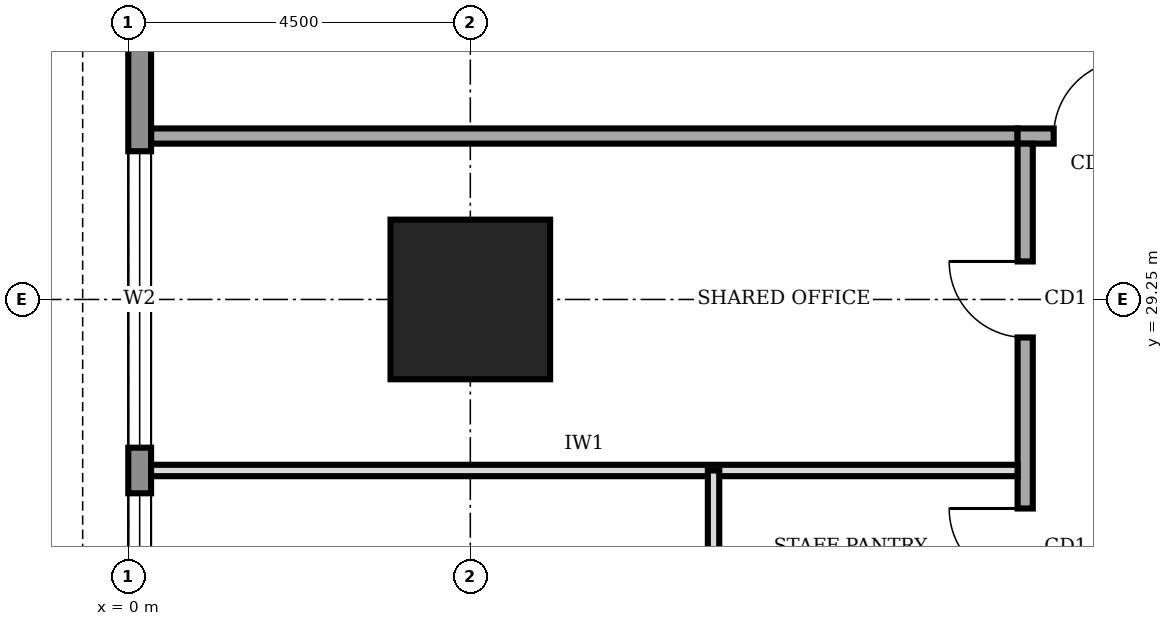
"""IFC4 building model, lengths in metres.
Left out: names, types, materials, properties, quantities, classifications, styles, units other than length and angle.
Written with IfcOpenShell. Run it as: python <this file> out.ifc"""

import sys

from ifc_helpers import new_model, si_unit, direction, frame, frame_2d, origin, origin_2d, place, context, subcontext, project, spatial, rectangle, extrude, element, fill, save


model = new_model("IFC4")
c1 = context("Model", 3, precision=1e-05, world=origin(), true_north=direction((0.0, 1.0)))
c2 = subcontext(c1, "Body", "Model", "MODEL_VIEW")
j1 = project(units=[si_unit("LENGTHUNIT", "METRE"), si_unit("PLANEANGLEUNIT", "RADIAN")], contexts=[c1])
p1 = place(None, origin())
s1 = spatial("IfcSite", under=j1, at=p1, CompositionType="ELEMENT")
p2 = place(p1, origin())
s2 = spatial("IfcBuilding", under=s1, at=p2, CompositionType="ELEMENT")
p3 = place(p2, frame((0.0, 0.0, 137.0)))
s3 = spatial("IfcBuildingStorey", under=s2, at=p3, CompositionType="ELEMENT", Elevation=137.0)
p4 = place(p3, frame((4.5, 29.25, 0.0), z_axis=(0.0, 0.0, 1.0), x_axis=(1.0, 0.0, 0.0)))
e1 = element("IfcColumn", 1, at=p4, inside=s3, PredefinedType="COLUMN", context=c2, shape_type="SweptSolid", body=[
    extrude(rectangle(XDim=2.1, YDim=2.1, at=origin_2d()), origin(), (0.0, 0.0, 1.0), 4.0),
])
p5 = place(p3, frame((0.15, 35.98, 0.0), z_axis=(0.0, 0.0, 1.0), x_axis=(0.0, -1.0, 0.0)))
e2 = element("IfcWall", 2, at=p5, inside=s3, PredefinedType="STANDARD", context=c2, shape_type="SweptSolid", body=[
    extrude(rectangle(XDim=31.46, YDim=0.3, at=frame_2d((15.73, 0.0))), origin(), (0.0, 0.0, 1.0), 3.75),
])
p6 = place(p5, frame((27.28, 0.0, 0.6)))
e3 = element("IfcOpeningElement", 3, at=p6, cuts=e2, PredefinedType="OPENING", context=c2, shape_type="SweptSolid", body=[
    extrude(rectangle(XDim=3.9, YDim=2.6, at=frame_2d((1.95, 1.3))), frame((0.0, 0.16, 0.0), z_axis=(0.0, -1.0, 0.0), x_axis=(1.0, 0.0, 0.0)), (0.0, 0.0, 1.0), 0.32),
])
p7 = place(p5, frame((22.78, 0.0, 0.6)))
e4 = element("IfcOpeningElement", 4, at=p7, cuts=e2, PredefinedType="OPENING", context=c2, shape_type="SweptSolid", body=[
    extrude(rectangle(XDim=3.9, YDim=2.6, at=frame_2d((1.95, 1.3))), frame((0.0, 0.16, 0.0), z_axis=(0.0, -1.0, 0.0), x_axis=(1.0, 0.0, 0.0)), (0.0, 0.0, 1.0), 0.32),
])
p8 = place(p5, frame((18.28, 0.0, 0.6)))
e5 = element("IfcOpeningElement", 5, at=p8, cuts=e2, PredefinedType="OPENING", context=c2, shape_type="SweptSolid", body=[
    extrude(rectangle(XDim=3.9, YDim=2.6, at=frame_2d((1.95, 1.3))), frame((0.0, 0.16, 0.0), z_axis=(0.0, -1.0, 0.0), x_axis=(1.0, 0.0, 0.0)), (0.0, 0.0, 1.0), 0.32),
])
p9 = place(p5, frame((13.78, 0.0, 0.6)))
e6 = element("IfcOpeningElement", 6, at=p9, cuts=e2, PredefinedType="OPENING", context=c2, shape_type="SweptSolid", body=[
    extrude(rectangle(XDim=3.9, YDim=2.6, at=frame_2d((1.95, 1.3))), frame((0.0, 0.16, 0.0), z_axis=(0.0, -1.0, 0.0), x_axis=(1.0, 0.0, 0.0)), (0.0, 0.0, 1.0), 0.32),
])
p10 = place(p5, frame((9.28, 0.0, 0.6)))
e7 = element("IfcOpeningElement", 7, at=p10, cuts=e2, PredefinedType="OPENING", context=c2, shape_type="SweptSolid", body=[
    extrude(rectangle(XDim=3.9, YDim=2.6, at=frame_2d((1.95, 1.3))), frame((0.0, 0.16, 0.0), z_axis=(0.0, -1.0, 0.0), x_axis=(1.0, 0.0, 0.0)), (0.0, 0.0, 1.0), 0.32),
])
p11 = place(p5, frame((4.78, 0.0, 0.6)))
e8 = element("IfcOpeningElement", 8, at=p11, cuts=e2, PredefinedType="OPENING", context=c2, shape_type="SweptSolid", body=[
    extrude(rectangle(XDim=3.9, YDim=2.6, at=frame_2d((1.95, 1.3))), frame((0.0, 0.16, 0.0), z_axis=(0.0, -1.0, 0.0), x_axis=(1.0, 0.0, 0.0)), (0.0, 0.0, 1.0), 0.32),
])
p12 = place(p3, frame((28.6, 31.4, 0.0), z_axis=(0.0, 0.0, 1.0), x_axis=(-1.0, 0.0, 0.0)))
e9 = element("IfcWall", 9, at=p12, inside=s3, PredefinedType="SOLIDWALL", context=c2, shape_type="SweptSolid", body=[
    extrude(rectangle(XDim=16.9, YDim=0.2, at=frame_2d((8.45, 0.0))), origin(), (0.0, 0.0, 1.0), 3.75),
])
p13 = place(p12, frame((15.425, 0.0, 0.0)))
e10 = element("IfcOpeningElement", 10, at=p13, cuts=e9, PredefinedType="OPENING", context=c2, shape_type="SweptSolid", body=[
    extrude(rectangle(XDim=1.0, YDim=2.1, at=frame_2d((0.5, 1.05))), frame((0.0, 0.11, 0.0), z_axis=(0.0, -1.0, 0.0), x_axis=(1.0, 0.0, 0.0)), (0.0, 0.0, 1.0), 0.22),
])
p14 = place(p12, frame((12.35, 0.0, 0.0)))
e11 = element("IfcOpeningElement", 11, at=p14, cuts=e9, PredefinedType="OPENING", context=c2, shape_type="SweptSolid", body=[
    extrude(rectangle(XDim=1.0, YDim=2.1, at=frame_2d((0.5, 1.05))), frame((0.0, 0.11, 0.0), z_axis=(0.0, -1.0, 0.0), x_axis=(1.0, 0.0, 0.0)), (0.0, 0.0, 1.0), 0.22),
])
p15 = place(p12, frame((5.6, 0.0, 0.0)))
e12 = element("IfcOpeningElement", 12, at=p15, cuts=e9, PredefinedType="OPENING", context=c2, shape_type="SweptSolid", body=[
    extrude(rectangle(XDim=1.0, YDim=2.1, at=frame_2d((0.5, 1.05))), frame((0.0, 0.11, 0.0), z_axis=(0.0, -1.0, 0.0), x_axis=(1.0, 0.0, 0.0)), (0.0, 0.0, 1.0), 0.22),
])
p16 = place(p12, frame((0.275, 0.0, 0.0)))
e13 = element("IfcOpeningElement", 13, at=p16, cuts=e9, PredefinedType="OPENING", context=c2, shape_type="SweptSolid", body=[
    extrude(rectangle(XDim=1.0, YDim=2.1, at=frame_2d((0.5, 1.05))), frame((0.0, 0.11, 0.0), z_axis=(0.0, -1.0, 0.0), x_axis=(1.0, 0.0, 0.0)), (0.0, 0.0, 1.0), 0.22),
])
p17 = place(p3, frame((11.8, 31.3, 0.0), z_axis=(0.0, 0.0, 1.0), x_axis=(0.0, -1.0, 0.0)))
e14 = element("IfcWall", 14, at=p17, inside=s3, PredefinedType="SOLIDWALL", context=c2, shape_type="SweptSolid", body=[
    extrude(rectangle(XDim=22.3, YDim=0.2, at=frame_2d((11.15, 0.0))), origin(), (0.0, 0.0, 1.0), 3.75),
])
p18 = place(p17, frame((19.55, 0.0, 0.0)))
e15 = element("IfcOpeningElement", 15, at=p18, cuts=e14, PredefinedType="OPENING", context=c2, shape_type="SweptSolid", body=[
    extrude(rectangle(XDim=1.0, YDim=2.1, at=frame_2d((0.5, 1.05))), frame((0.0, 0.11, 0.0), z_axis=(0.0, -1.0, 0.0), x_axis=(1.0, 0.0, 0.0)), (0.0, 0.0, 1.0), 0.22),
])
p19 = place(p17, frame((15.45, 0.0, 0.0)))
e16 = element("IfcOpeningElement", 16, at=p19, cuts=e14, PredefinedType="OPENING", context=c2, shape_type="SweptSolid", body=[
    extrude(rectangle(XDim=0.9, YDim=2.1, at=frame_2d((0.45, 1.05))), frame((0.0, 0.11, 0.0), z_axis=(0.0, -1.0, 0.0), x_axis=(1.0, 0.0, 0.0)), (0.0, 0.0, 1.0), 0.22),
])
p20 = place(p17, frame((12.45, 0.0, 0.0)))
e17 = element("IfcOpeningElement", 17, at=p20, cuts=e14, PredefinedType="OPENING", context=c2, shape_type="SweptSolid", body=[
    extrude(rectangle(XDim=0.9, YDim=2.1, at=frame_2d((0.45, 1.05))), frame((0.0, 0.11, 0.0), z_axis=(0.0, -1.0, 0.0), x_axis=(1.0, 0.0, 0.0)), (0.0, 0.0, 1.0), 0.22),
])
p21 = place(p17, frame((7.6, 0.0, 0.0)))
e18 = element("IfcOpeningElement", 18, at=p21, cuts=e14, PredefinedType="OPENING", context=c2, shape_type="SweptSolid", body=[
    extrude(rectangle(XDim=0.9, YDim=2.1, at=frame_2d((0.45, 1.05))), frame((0.0, 0.11, 0.0), z_axis=(0.0, -1.0, 0.0), x_axis=(1.0, 0.0, 0.0)), (0.0, 0.0, 1.0), 0.22),
])
p22 = place(p17, frame((4.8, 0.0, 0.0)))
e19 = element("IfcOpeningElement", 19, at=p22, cuts=e14, PredefinedType="OPENING", context=c2, shape_type="SweptSolid", body=[
    extrude(rectangle(XDim=1.0, YDim=2.1, at=frame_2d((0.5, 1.05))), frame((0.0, 0.11, 0.0), z_axis=(0.0, -1.0, 0.0), x_axis=(1.0, 0.0, 0.0)), (0.0, 0.0, 1.0), 0.22),
])
p23 = place(p17, frame((10.3, 0.0, 0.0)))
e20 = element("IfcOpeningElement", 20, at=p23, cuts=e14, PredefinedType="OPENING", context=c2, shape_type="SweptSolid", body=[
    extrude(rectangle(XDim=1.0, YDim=2.1, at=frame_2d((0.5, 1.05))), frame((0.0, 0.11, 0.0), z_axis=(0.0, -1.0, 0.0), x_axis=(1.0, 0.0, 0.0)), (0.0, 0.0, 1.0), 0.22),
])
p24 = place(p17, frame((1.55, 0.0, 0.0)))
e21 = element("IfcOpeningElement", 21, at=p24, cuts=e14, PredefinedType="OPENING", context=c2, shape_type="SweptSolid", body=[
    extrude(rectangle(XDim=1.0, YDim=2.1, at=frame_2d((0.5, 1.05))), frame((0.0, 0.11, 0.0), z_axis=(0.0, -1.0, 0.0), x_axis=(1.0, 0.0, 0.0)), (0.0, 0.0, 1.0), 0.22),
])
p25 = place(p3, frame((0.3, 31.4, 0.0), z_axis=(0.0, 0.0, 1.0), x_axis=(1.0, 0.0, 0.0)))
e22 = element("IfcWall", 22, at=p25, inside=s3, PredefinedType="SOLIDWALL", context=c2, shape_type="SweptSolid", body=[
    extrude(rectangle(XDim=11.4, YDim=0.2, at=frame_2d((5.7, 0.0))), origin(), (0.0, 0.0, 1.0), 3.75),
])
p26 = place(p3, frame((0.3, 27.0, 0.0), z_axis=(0.0, 0.0, 1.0), x_axis=(1.0, 0.0, 0.0)))
e23 = element("IfcWall", 23, at=p26, inside=s3, PredefinedType="PARTITIONING", context=c2, shape_type="SweptSolid", body=[
    extrude(rectangle(XDim=11.4, YDim=0.15, at=frame_2d((5.7, 0.0))), origin(), (0.0, 0.0, 1.0), 3.75),
])
p27 = place(p3, frame((7.7, 25.0, 0.0), z_axis=(0.0, 0.0, 1.0), x_axis=(0.0, 1.0, 0.0)))
e24 = element("IfcWall", 24, at=p27, inside=s3, PredefinedType="PARTITIONING", context=c2, shape_type="SweptSolid", body=[
    extrude(rectangle(XDim=2.0, YDim=0.15, at=frame_2d((1.0, 0.0))), origin(), (0.0, 0.0, 1.0), 3.75),
])
p28 = place(p10, origin())
e25 = element("IfcWindow", 25, at=p28, inside=s3, PartitioningType="SINGLE_PANEL", PredefinedType="WINDOW", context=c2, shape_type="SweptSolid", body=[
    extrude(rectangle(XDim=3.9, YDim=2.6, at=frame_2d((1.95, 1.3))), frame((0.0, 0.03, 0.0), z_axis=(0.0, -1.0, 0.0), x_axis=(1.0, 0.0, 0.0)), (0.0, 0.0, 1.0), 0.06),
])
fill(e7, e25)
p29 = place(p11, origin())
e26 = element("IfcWindow", 26, at=p29, inside=s3, PartitioningType="SINGLE_PANEL", PredefinedType="WINDOW", context=c2, shape_type="SweptSolid", body=[
    extrude(rectangle(XDim=3.9, YDim=2.6, at=frame_2d((1.95, 1.3))), frame((0.0, 0.03, 0.0), z_axis=(0.0, -1.0, 0.0), x_axis=(1.0, 0.0, 0.0)), (0.0, 0.0, 1.0), 0.06),
])
fill(e8, e26)
p30 = place(p13, frame((1.0, 0.0, 0.0), z_axis=(0.0, 0.0, 1.0), x_axis=(-1.0, 0.0, 0.0)))
e27 = element("IfcDoor", 27, at=p30, inside=s3, OperationType="SINGLE_SWING_RIGHT", PredefinedType="DOOR", context=c2, shape_type="SweptSolid", body=[
    extrude(rectangle(XDim=1.0, YDim=2.1, at=frame_2d((0.5, 1.05))), frame((0.0, 0.025, 0.0), z_axis=(0.0, -1.0, 0.0), x_axis=(1.0, 0.0, 0.0)), (0.0, 0.0, 1.0), 0.05),
])
fill(e10, e27)
p31 = place(p22, frame((1.0, 0.0, 0.0), z_axis=(0.0, 0.0, 1.0), x_axis=(-1.0, 0.0, 0.0)))
e28 = element("IfcDoor", 28, at=p31, inside=s3, OperationType="SINGLE_SWING_RIGHT", PredefinedType="DOOR", context=c2, shape_type="SweptSolid", body=[
    extrude(rectangle(XDim=1.0, YDim=2.1, at=frame_2d((0.5, 1.05))), frame((0.0, 0.025, 0.0), z_axis=(0.0, -1.0, 0.0), x_axis=(1.0, 0.0, 0.0)), (0.0, 0.0, 1.0), 0.05),
])
fill(e19, e28)
p32 = place(p24, frame((1.0, 0.0, 0.0), z_axis=(0.0, 0.0, 1.0), x_axis=(-1.0, 0.0, 0.0)))
e29 = element("IfcDoor", 29, at=p32, inside=s3, OperationType="SINGLE_SWING_RIGHT", PredefinedType="DOOR", context=c2, shape_type="SweptSolid", body=[
    extrude(rectangle(XDim=1.0, YDim=2.1, at=frame_2d((0.5, 1.05))), frame((0.0, 0.025, 0.0), z_axis=(0.0, -1.0, 0.0), x_axis=(1.0, 0.0, 0.0)), (0.0, 0.0, 1.0), 0.05),
])
fill(e21, e29)
save(model, sys.argv[1])
